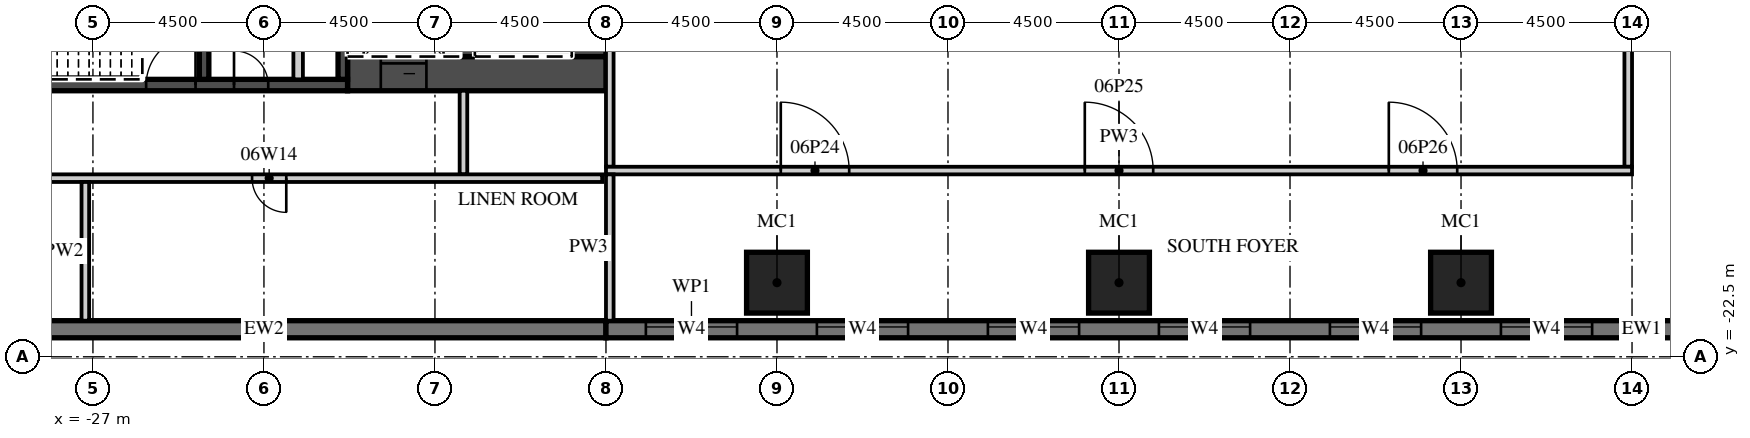
"""IFC4 building model, lengths in metres.
Left out: names, types, materials, properties, quantities, classifications, styles, units other than length and angle.
Written with IfcOpenShell. Run it as: python <this file> out.ifc"""

import sys

from ifc_helpers import new_model, si_unit, direction, frame, frame_2d, origin, origin_2d, place, context, subcontext, project, spatial, rectangle, extrude, element, fill, save


model = new_model("IFC4")
c1 = context("Model", 3, precision=1e-05, world=origin(), true_north=direction((0.0, 1.0)))
c2 = subcontext(c1, "Body", "Model", "MODEL_VIEW")
j1 = project(units=[si_unit("LENGTHUNIT", "METRE"), si_unit("PLANEANGLEUNIT", "RADIAN")], contexts=[c1])
p1 = place(None, origin())
s1 = spatial("IfcSite", under=j1, at=p1, CompositionType="ELEMENT")
p2 = place(p1, origin())
s2 = spatial("IfcBuilding", under=s1, at=p2, CompositionType="ELEMENT")
p3 = place(p2, frame((0.0, 0.0, 38.0)))
s3 = spatial("IfcBuildingStorey", under=s2, at=p3, CompositionType="ELEMENT", Elevation=38.0)
for number, where, z_axis, x_axis in (
    (1, (-9.0, -20.55, 0.0), (0.0, 0.0, 1.0), (1.0, 0.0, 0.0)),
    (2, (0.0, -20.55, 0.0), (0.0, 0.0, 1.0), (1.0, 0.0, 0.0)),
    (3, (9.0, -20.55, 0.0), (0.0, 0.0, 1.0), (1.0, 0.0, 0.0)),
):
    element("IfcColumn", number, at=place(p3, frame(where, z_axis=z_axis, x_axis=x_axis)), inside=s3, PredefinedType="COLUMN", context=c2, shape_type="SweptSolid", body=[
        extrude(rectangle(XDim=1.6, YDim=1.6, at=origin_2d()), origin(), (0.0, 0.0, 1.0), 8.7),
    ])
p4 = place(p3, frame((-31.5, -21.775, 0.0), z_axis=(0.0, 0.0, 1.0), x_axis=(1.0, 0.0, 0.0)))
e4 = element("IfcWall", 4, at=p4, inside=s3, PredefinedType="SOLIDWALL", context=c2, shape_type="SweptSolid", body=[
    extrude(rectangle(XDim=18.0, YDim=0.45, at=frame_2d((9.0, 0.0))), origin(), (0.0, 0.0, 1.0), 8.7),
])
p5 = place(p3, frame((-13.5, -21.775, 0.0), z_axis=(0.0, 0.0, 1.0), x_axis=(1.0, 0.0, 0.0)))
e5 = element("IfcWall", 5, at=p5, inside=s3, PredefinedType="SOLIDWALL", context=c2, shape_type="SweptSolid", body=[
    extrude(rectangle(XDim=54.5, YDim=0.45, at=frame_2d((27.25, 0.0))), origin(), (0.0, 0.0, 1.0), 8.7),
])
p6 = place(p5, frame((1.05, 0.0, 0.9)))
e6 = element("IfcOpeningElement", 6, at=p6, cuts=e5, PredefinedType="OPENING", context=c2, shape_type="SweptSolid", body=[
    extrude(rectangle(XDim=2.4, YDim=1.8, at=frame_2d((1.2, 0.9))), frame((0.0, 0.235, 0.0), z_axis=(0.0, -1.0, 0.0), x_axis=(1.0, 0.0, 0.0)), (0.0, 0.0, 1.0), 0.47),
])
p7 = place(p5, frame((5.55, 0.0, 0.9)))
e7 = element("IfcOpeningElement", 7, at=p7, cuts=e5, PredefinedType="OPENING", context=c2, shape_type="SweptSolid", body=[
    extrude(rectangle(XDim=2.4, YDim=1.8, at=frame_2d((1.2, 0.9))), frame((0.0, 0.235, 0.0), z_axis=(0.0, -1.0, 0.0), x_axis=(1.0, 0.0, 0.0)), (0.0, 0.0, 1.0), 0.47),
])
p8 = place(p5, frame((10.05, 0.0, 0.9)))
e8 = element("IfcOpeningElement", 8, at=p8, cuts=e5, PredefinedType="OPENING", context=c2, shape_type="SweptSolid", body=[
    extrude(rectangle(XDim=2.4, YDim=1.8, at=frame_2d((1.2, 0.9))), frame((0.0, 0.235, 0.0), z_axis=(0.0, -1.0, 0.0), x_axis=(1.0, 0.0, 0.0)), (0.0, 0.0, 1.0), 0.47),
])
p9 = place(p5, frame((14.55, 0.0, 0.9)))
e9 = element("IfcOpeningElement", 9, at=p9, cuts=e5, PredefinedType="OPENING", context=c2, shape_type="SweptSolid", body=[
    extrude(rectangle(XDim=2.4, YDim=1.8, at=frame_2d((1.2, 0.9))), frame((0.0, 0.235, 0.0), z_axis=(0.0, -1.0, 0.0), x_axis=(1.0, 0.0, 0.0)), (0.0, 0.0, 1.0), 0.47),
])
p10 = place(p5, frame((19.05, 0.0, 0.9)))
e10 = element("IfcOpeningElement", 10, at=p10, cuts=e5, PredefinedType="OPENING", context=c2, shape_type="SweptSolid", body=[
    extrude(rectangle(XDim=2.4, YDim=1.8, at=frame_2d((1.2, 0.9))), frame((0.0, 0.235, 0.0), z_axis=(0.0, -1.0, 0.0), x_axis=(1.0, 0.0, 0.0)), (0.0, 0.0, 1.0), 0.47),
])
p11 = place(p5, frame((23.55, 0.0, 0.9)))
e11 = element("IfcOpeningElement", 11, at=p11, cuts=e5, PredefinedType="OPENING", context=c2, shape_type="SweptSolid", body=[
    extrude(rectangle(XDim=2.4, YDim=1.8, at=frame_2d((1.2, 0.9))), frame((0.0, 0.235, 0.0), z_axis=(0.0, -1.0, 0.0), x_axis=(1.0, 0.0, 0.0)), (0.0, 0.0, 1.0), 0.47),
])
p12 = place(p5, frame((28.05, 0.0, 0.9)))
e12 = element("IfcOpeningElement", 12, at=p12, cuts=e5, PredefinedType="OPENING", context=c2, shape_type="SweptSolid", body=[
    extrude(rectangle(XDim=2.4, YDim=1.8, at=frame_2d((1.2, 0.9))), frame((0.0, 0.235, 0.0), z_axis=(0.0, -1.0, 0.0), x_axis=(1.0, 0.0, 0.0)), (0.0, 0.0, 1.0), 0.47),
])
p13 = place(p5, frame((32.55, 0.0, 0.9)))
e13 = element("IfcOpeningElement", 13, at=p13, cuts=e5, PredefinedType="OPENING", context=c2, shape_type="SweptSolid", body=[
    extrude(rectangle(XDim=2.4, YDim=1.8, at=frame_2d((1.2, 0.9))), frame((0.0, 0.235, 0.0), z_axis=(0.0, -1.0, 0.0), x_axis=(1.0, 0.0, 0.0)), (0.0, 0.0, 1.0), 0.47),
])
p14 = place(p5, frame((37.05, 0.0, 0.9)))
e14 = element("IfcOpeningElement", 14, at=p14, cuts=e5, PredefinedType="OPENING", context=c2, shape_type="SweptSolid", body=[
    extrude(rectangle(XDim=2.4, YDim=1.8, at=frame_2d((1.2, 0.9))), frame((0.0, 0.235, 0.0), z_axis=(0.0, -1.0, 0.0), x_axis=(1.0, 0.0, 0.0)), (0.0, 0.0, 1.0), 0.47),
])
p15 = place(p5, frame((41.55, 0.0, 0.9)))
e15 = element("IfcOpeningElement", 15, at=p15, cuts=e5, PredefinedType="OPENING", context=c2, shape_type="SweptSolid", body=[
    extrude(rectangle(XDim=2.4, YDim=1.8, at=frame_2d((1.2, 0.9))), frame((0.0, 0.235, 0.0), z_axis=(0.0, -1.0, 0.0), x_axis=(1.0, 0.0, 0.0)), (0.0, 0.0, 1.0), 0.47),
])
p16 = place(p5, frame((46.05, 0.0, 0.9)))
e16 = element("IfcOpeningElement", 16, at=p16, cuts=e5, PredefinedType="OPENING", context=c2, shape_type="SweptSolid", body=[
    extrude(rectangle(XDim=2.4, YDim=1.8, at=frame_2d((1.2, 0.9))), frame((0.0, 0.235, 0.0), z_axis=(0.0, -1.0, 0.0), x_axis=(1.0, 0.0, 0.0)), (0.0, 0.0, 1.0), 0.47),
])
p17 = place(p3, frame((-20.3, -15.05, 0.0), z_axis=(0.0, 0.0, 1.0), x_axis=(1.0, 0.0, 0.0)))
e17 = element("IfcWall", 17, at=p17, inside=s3, PredefinedType="SHEAR", context=c2, shape_type="SweptSolid", body=[
    extrude(rectangle(XDim=6.8, YDim=0.9, at=frame_2d((3.4, 0.0))), origin(), (0.0, 0.0, 1.0), 8.7),
])
p18 = place(p17, frame((0.875, 0.0, 0.0)))
e18 = element("IfcOpeningElement", 18, at=p18, cuts=e17, PredefinedType="OPENING", context=c2, shape_type="SweptSolid", body=[
    extrude(rectangle(XDim=1.2, YDim=2.1, at=frame_2d((0.6, 1.05))), frame((0.0, 0.46, 0.0), z_axis=(0.0, -1.0, 0.0), x_axis=(1.0, 0.0, 0.0)), (0.0, 0.0, 1.0), 0.92),
])
p19 = place(p3, frame((-30.6, -15.35, 0.0), z_axis=(0.0, 0.0, 1.0), x_axis=(1.0, 0.0, 0.0)))
e19 = element("IfcWall", 19, at=p19, inside=s3, PredefinedType="SHEAR", context=c2, shape_type="SweptSolid", body=[
    extrude(rectangle(XDim=10.3, YDim=0.3, at=frame_2d((5.15, 0.0))), origin(), (0.0, 0.0, 1.0), 8.7),
])
p20 = place(p19, frame((5.0, 0.0, 0.0)))
e20 = element("IfcOpeningElement", 20, at=p20, cuts=e19, PredefinedType="OPENING", context=c2, shape_type="SweptSolid", body=[
    extrude(rectangle(XDim=1.3, YDim=2.1, at=frame_2d((0.65, 1.05))), frame((0.0, 0.16, 0.0), z_axis=(0.0, -1.0, 0.0), x_axis=(1.0, 0.0, 0.0)), (0.0, 0.0, 1.0), 0.32),
])
p21 = place(p19, frame((7.312, 0.0, 0.0)))
e21 = element("IfcOpeningElement", 21, at=p21, cuts=e19, PredefinedType="OPENING", context=c2, shape_type="SweptSolid", body=[
    extrude(rectangle(XDim=0.9, YDim=2.1, at=frame_2d((0.45, 1.05))), frame((0.0, 0.16, 0.0), z_axis=(0.0, -1.0, 0.0), x_axis=(1.0, 0.0, 0.0)), (0.0, 0.0, 1.0), 0.32),
])
p22 = place(p3, frame((-13.95, -14.6, 0.0), z_axis=(0.0, 0.0, 1.0), x_axis=(0.0, 1.0, 0.0)))
e22 = element("IfcWall", 22, at=p22, inside=s3, PredefinedType="SHEAR", context=c2, shape_type="SweptSolid", body=[
    extrude(rectangle(XDim=12.2, YDim=0.9, at=frame_2d((6.1, 0.0))), origin(), (0.0, 0.0, 1.0), 8.7),
])
p23 = place(p3, frame((-17.15, -14.6, 0.0), z_axis=(0.0, 0.0, 1.0), x_axis=(0.0, 1.0, 0.0)))
e23 = element("IfcWall", 23, at=p23, inside=s3, PredefinedType="SHEAR", context=c2, shape_type="SweptSolid", body=[
    extrude(rectangle(XDim=5.8, YDim=0.4, at=frame_2d((2.9, 0.0))), origin(), (0.0, 0.0, 1.0), 8.7),
])
for number, where, z_axis, x_axis in (
    (24, (-20.425, -15.2, 0.0), (0.0, 0.0, 1.0), (0.0, 1.0, 0.0)),
    (25, (-24.075, -15.2, 0.0), (0.0, 0.0, 1.0), (0.0, 1.0, 0.0)),
):
    element("IfcWall", number, at=place(p3, frame(where, z_axis=z_axis, x_axis=x_axis)), inside=s3, PredefinedType="SHEAR", context=c2, shape_type="SweptSolid", body=[
        extrude(rectangle(XDim=3.25, YDim=0.25, at=frame_2d((1.625, 0.0))), origin(), (0.0, 0.0, 1.0), 8.7),
    ])
p24 = place(p3, frame((-21.6, -15.2, 0.0), z_axis=(0.0, 0.0, 1.0), x_axis=(0.0, 1.0, 0.0)))
e26 = element("IfcWall", 26, at=p24, inside=s3, PredefinedType="PARTITIONING", context=c2, shape_type="SweptSolid", body=[
    extrude(rectangle(XDim=3.25, YDim=0.25, at=frame_2d((1.625, 0.0))), origin(), (0.0, 0.0, 1.0), 8.7),
])
p25 = place(p3, frame((-17.25, -17.7, 0.0), z_axis=(0.0, 0.0, 1.0), x_axis=(0.0, 1.0, 0.0)))
e27 = element("IfcWall", 27, at=p25, inside=s3, PredefinedType="PARTITIONING", context=c2, shape_type="SweptSolid", body=[
    extrude(rectangle(XDim=2.2, YDim=0.2, at=frame_2d((1.1, 0.0))), origin(), (0.0, 0.0, 1.0), 8.7),
])
p26 = place(p3, frame((-44.55, -17.8, 0.0), z_axis=(0.0, 0.0, 1.0), x_axis=(1.0, 0.0, 0.0)))
e28 = element("IfcWall", 28, at=p26, inside=s3, PredefinedType="PARTITIONING", context=c2, shape_type="SweptSolid", body=[
    extrude(rectangle(XDim=30.95, YDim=0.2, at=frame_2d((15.475, 0.0))), origin(), (0.0, 0.0, 1.0), 8.7),
])
p27 = place(p26, frame((13.438, 0.0, 0.0)))
e29 = element("IfcOpeningElement", 29, at=p27, cuts=e28, PredefinedType="OPENING", context=c2, shape_type="SweptSolid", body=[
    extrude(rectangle(XDim=0.9, YDim=2.1, at=frame_2d((0.45, 1.05))), frame((0.0, 0.11, 0.0), z_axis=(0.0, -1.0, 0.0), x_axis=(1.0, 0.0, 0.0)), (0.0, 0.0, 1.0), 0.22),
])
p28 = place(p26, frame((21.738, 0.0, 0.0)))
e30 = element("IfcOpeningElement", 30, at=p28, cuts=e28, PredefinedType="OPENING", context=c2, shape_type="SweptSolid", body=[
    extrude(rectangle(XDim=0.9, YDim=2.1, at=frame_2d((0.45, 1.05))), frame((0.0, 0.11, 0.0), z_axis=(0.0, -1.0, 0.0), x_axis=(1.0, 0.0, 0.0)), (0.0, 0.0, 1.0), 0.22),
])
p29 = place(p3, frame((-27.2, -21.55, 0.0), z_axis=(0.0, 0.0, 1.0), x_axis=(0.0, 1.0, 0.0)))
e31 = element("IfcWall", 31, at=p29, inside=s3, PredefinedType="PARTITIONING", context=c2, shape_type="SweptSolid", body=[
    extrude(rectangle(XDim=3.65, YDim=0.2, at=frame_2d((1.825, 0.0))), origin(), (0.0, 0.0, 1.0), 8.7),
])
p30 = place(p3, frame((-13.4, -17.5, 0.0), z_axis=(0.0, 0.0, 1.0), x_axis=(0.0, 1.0, 0.0)))
e32 = element("IfcWall", 32, at=p30, inside=s3, PredefinedType="PARTITIONING", context=c2, shape_type="SweptSolid", body=[
    extrude(rectangle(XDim=35.0, YDim=0.2, at=frame_2d((17.5, 0.0))), origin(), (0.0, 0.0, 1.0), 8.7),
])
p31 = place(p30, frame((22.6, 0.0, 0.0)))
e33 = element("IfcOpeningElement", 33, at=p31, cuts=e32, PredefinedType="OPENING", context=c2, shape_type="SweptSolid", body=[
    extrude(rectangle(XDim=1.8, YDim=2.1, at=frame_2d((0.9, 1.05))), frame((0.0, 0.11, 0.0), z_axis=(0.0, -1.0, 0.0), x_axis=(1.0, 0.0, 0.0)), (0.0, 0.0, 1.0), 0.22),
])
p32 = place(p30, frame((28.6, 0.0, 0.0)))
e34 = element("IfcOpeningElement", 34, at=p32, cuts=e32, PredefinedType="OPENING", context=c2, shape_type="SweptSolid", body=[
    extrude(rectangle(XDim=1.8, YDim=2.1, at=frame_2d((0.9, 1.05))), frame((0.0, 0.11, 0.0), z_axis=(0.0, -1.0, 0.0), x_axis=(1.0, 0.0, 0.0)), (0.0, 0.0, 1.0), 0.22),
])
p33 = place(p3, frame((13.4, -17.5, 0.0), z_axis=(0.0, 0.0, 1.0), x_axis=(0.0, 1.0, 0.0)))
e35 = element("IfcWall", 35, at=p33, inside=s3, PredefinedType="PARTITIONING", context=c2, shape_type="SweptSolid", body=[
    extrude(rectangle(XDim=35.0, YDim=0.2, at=frame_2d((17.5, 0.0))), origin(), (0.0, 0.0, 1.0), 8.7),
])
p34 = place(p33, frame((10.6, 0.0, 0.0)))
e36 = element("IfcOpeningElement", 36, at=p34, cuts=e35, PredefinedType="OPENING", context=c2, shape_type="SweptSolid", body=[
    extrude(rectangle(XDim=1.8, YDim=2.1, at=frame_2d((0.9, 1.05))), frame((0.0, 0.11, 0.0), z_axis=(0.0, -1.0, 0.0), x_axis=(1.0, 0.0, 0.0)), (0.0, 0.0, 1.0), 0.22),
])
p35 = place(p33, frame((4.6, 0.0, 0.0)))
e37 = element("IfcOpeningElement", 37, at=p35, cuts=e35, PredefinedType="OPENING", context=c2, shape_type="SweptSolid", body=[
    extrude(rectangle(XDim=1.8, YDim=2.1, at=frame_2d((0.9, 1.05))), frame((0.0, 0.11, 0.0), z_axis=(0.0, -1.0, 0.0), x_axis=(1.0, 0.0, 0.0)), (0.0, 0.0, 1.0), 0.22),
])
p36 = place(p3, frame((-13.5, -17.6, 0.0), z_axis=(0.0, 0.0, 1.0), x_axis=(1.0, 0.0, 0.0)))
e38 = element("IfcWall", 38, at=p36, inside=s3, PredefinedType="PARTITIONING", context=c2, shape_type="SweptSolid", body=[
    extrude(rectangle(XDim=27.0, YDim=0.2, at=frame_2d((13.5, 0.0))), origin(), (0.0, 0.0, 1.0), 8.7),
])
p37 = place(p36, frame((4.6, 0.0, 0.0)))
e39 = element("IfcOpeningElement", 39, at=p37, cuts=e38, PredefinedType="OPENING", context=c2, shape_type="SweptSolid", body=[
    extrude(rectangle(XDim=1.8, YDim=2.1, at=frame_2d((0.9, 1.05))), frame((0.0, 0.11, 0.0), z_axis=(0.0, -1.0, 0.0), x_axis=(1.0, 0.0, 0.0)), (0.0, 0.0, 1.0), 0.22),
])
p38 = place(p36, frame((12.6, 0.0, 0.0)))
e40 = element("IfcOpeningElement", 40, at=p38, cuts=e38, PredefinedType="OPENING", context=c2, shape_type="SweptSolid", body=[
    extrude(rectangle(XDim=1.8, YDim=2.1, at=frame_2d((0.9, 1.05))), frame((0.0, 0.11, 0.0), z_axis=(0.0, -1.0, 0.0), x_axis=(1.0, 0.0, 0.0)), (0.0, 0.0, 1.0), 0.22),
])
p39 = place(p36, frame((20.6, 0.0, 0.0)))
e41 = element("IfcOpeningElement", 41, at=p39, cuts=e38, PredefinedType="OPENING", context=c2, shape_type="SweptSolid", body=[
    extrude(rectangle(XDim=1.8, YDim=2.1, at=frame_2d((0.9, 1.05))), frame((0.0, 0.11, 0.0), z_axis=(0.0, -1.0, 0.0), x_axis=(1.0, 0.0, 0.0)), (0.0, 0.0, 1.0), 0.22),
])
p40 = place(p3, frame((-13.4, -21.55, 0.0), z_axis=(0.0, 0.0, 1.0), x_axis=(0.0, 1.0, 0.0)))
e42 = element("IfcWall", 42, at=p40, inside=s3, PredefinedType="PARTITIONING", context=c2, shape_type="SweptSolid", body=[
    extrude(rectangle(XDim=3.85, YDim=0.2, at=frame_2d((1.925, 0.0))), origin(), (0.0, 0.0, 1.0), 8.7),
])
p41 = place(p6, origin())
e43 = element("IfcWindow", 43, at=p41, inside=s3, PartitioningType="SINGLE_PANEL", PredefinedType="WINDOW", context=c2, shape_type="SweptSolid", body=[
    extrude(rectangle(XDim=2.4, YDim=1.8, at=frame_2d((1.2, 0.9))), frame((0.0, 0.09, 0.0), z_axis=(0.0, -1.0, 0.0), x_axis=(1.0, 0.0, 0.0)), (0.0, 0.0, 1.0), 0.06),
])
fill(e6, e43)
p42 = place(p7, origin())
e44 = element("IfcWindow", 44, at=p42, inside=s3, PartitioningType="SINGLE_PANEL", PredefinedType="WINDOW", context=c2, shape_type="SweptSolid", body=[
    extrude(rectangle(XDim=2.4, YDim=1.8, at=frame_2d((1.2, 0.9))), frame((0.0, 0.09, 0.0), z_axis=(0.0, -1.0, 0.0), x_axis=(1.0, 0.0, 0.0)), (0.0, 0.0, 1.0), 0.06),
])
fill(e7, e44)
p43 = place(p8, origin())
e45 = element("IfcWindow", 45, at=p43, inside=s3, PartitioningType="SINGLE_PANEL", PredefinedType="WINDOW", context=c2, shape_type="SweptSolid", body=[
    extrude(rectangle(XDim=2.4, YDim=1.8, at=frame_2d((1.2, 0.9))), frame((0.0, 0.09, 0.0), z_axis=(0.0, -1.0, 0.0), x_axis=(1.0, 0.0, 0.0)), (0.0, 0.0, 1.0), 0.06),
])
fill(e8, e45)
p44 = place(p9, origin())
e46 = element("IfcWindow", 46, at=p44, inside=s3, PartitioningType="SINGLE_PANEL", PredefinedType="WINDOW", context=c2, shape_type="SweptSolid", body=[
    extrude(rectangle(XDim=2.4, YDim=1.8, at=frame_2d((1.2, 0.9))), frame((0.0, 0.09, 0.0), z_axis=(0.0, -1.0, 0.0), x_axis=(1.0, 0.0, 0.0)), (0.0, 0.0, 1.0), 0.06),
])
fill(e9, e46)
p45 = place(p10, origin())
e47 = element("IfcWindow", 47, at=p45, inside=s3, PartitioningType="SINGLE_PANEL", PredefinedType="WINDOW", context=c2, shape_type="SweptSolid", body=[
    extrude(rectangle(XDim=2.4, YDim=1.8, at=frame_2d((1.2, 0.9))), frame((0.0, 0.09, 0.0), z_axis=(0.0, -1.0, 0.0), x_axis=(1.0, 0.0, 0.0)), (0.0, 0.0, 1.0), 0.06),
])
fill(e10, e47)
p46 = place(p11, origin())
e48 = element("IfcWindow", 48, at=p46, inside=s3, PartitioningType="SINGLE_PANEL", PredefinedType="WINDOW", context=c2, shape_type="SweptSolid", body=[
    extrude(rectangle(XDim=2.4, YDim=1.8, at=frame_2d((1.2, 0.9))), frame((0.0, 0.09, 0.0), z_axis=(0.0, -1.0, 0.0), x_axis=(1.0, 0.0, 0.0)), (0.0, 0.0, 1.0), 0.06),
])
fill(e11, e48)
p47 = place(p18, origin())
e49 = element("IfcDoor", 49, at=p47, inside=s3, OperationType="SLIDING_TO_LEFT", PredefinedType="DOOR", context=c2, shape_type="SweptSolid", body=[
    extrude(rectangle(XDim=1.2, YDim=2.1, at=frame_2d((0.6, 1.05))), frame((0.0, 0.025, 0.0), z_axis=(0.0, -1.0, 0.0), x_axis=(1.0, 0.0, 0.0)), (0.0, 0.0, 1.0), 0.05),
])
fill(e18, e49)
p48 = place(p20, origin())
e50 = element("IfcDoor", 50, at=p48, inside=s3, OperationType="SINGLE_SWING_RIGHT", PredefinedType="DOOR", context=c2, shape_type="SweptSolid", body=[
    extrude(rectangle(XDim=1.3, YDim=2.1, at=frame_2d((0.65, 1.05))), frame((0.0, 0.025, 0.0), z_axis=(0.0, -1.0, 0.0), x_axis=(1.0, 0.0, 0.0)), (0.0, 0.0, 1.0), 0.05),
])
fill(e20, e50)
p49 = place(p21, origin())
e51 = element("IfcDoor", 51, at=p49, inside=s3, OperationType="SINGLE_SWING_LEFT", PredefinedType="DOOR", context=c2, shape_type="SweptSolid", body=[
    extrude(rectangle(XDim=0.9, YDim=2.1, at=frame_2d((0.45, 1.05))), frame((0.0, 0.025, 0.0), z_axis=(0.0, -1.0, 0.0), x_axis=(1.0, 0.0, 0.0)), (0.0, 0.0, 1.0), 0.05),
])
fill(e21, e51)
p50 = place(p28, origin())
e52 = element("IfcDoor", 52, at=p50, inside=s3, OperationType="SINGLE_SWING_RIGHT", PredefinedType="DOOR", context=c2, shape_type="SweptSolid", body=[
    extrude(rectangle(XDim=0.9, YDim=2.1, at=frame_2d((0.45, 1.05))), frame((0.0, 0.025, 0.0), z_axis=(0.0, -1.0, 0.0), x_axis=(1.0, 0.0, 0.0)), (0.0, 0.0, 1.0), 0.05),
])
fill(e30, e52)
p51 = place(p37, origin())
e53 = element("IfcDoor", 53, at=p51, inside=s3, OperationType="DOUBLE_DOOR_DOUBLE_SWING", PredefinedType="DOOR", context=c2, shape_type="SweptSolid", body=[
    extrude(rectangle(XDim=1.8, YDim=2.1, at=frame_2d((0.9, 1.05))), frame((0.0, 0.025, 0.0), z_axis=(0.0, -1.0, 0.0), x_axis=(1.0, 0.0, 0.0)), (0.0, 0.0, 1.0), 0.05),
])
fill(e39, e53)
p52 = place(p38, origin())
e54 = element("IfcDoor", 54, at=p52, inside=s3, OperationType="DOUBLE_DOOR_DOUBLE_SWING", PredefinedType="DOOR", context=c2, shape_type="SweptSolid", body=[
    extrude(rectangle(XDim=1.8, YDim=2.1, at=frame_2d((0.9, 1.05))), frame((0.0, 0.025, 0.0), z_axis=(0.0, -1.0, 0.0), x_axis=(1.0, 0.0, 0.0)), (0.0, 0.0, 1.0), 0.05),
])
fill(e40, e54)
p53 = place(p39, origin())
e55 = element("IfcDoor", 55, at=p53, inside=s3, OperationType="DOUBLE_DOOR_DOUBLE_SWING", PredefinedType="DOOR", context=c2, shape_type="SweptSolid", body=[
    extrude(rectangle(XDim=1.8, YDim=2.1, at=frame_2d((0.9, 1.05))), frame((0.0, 0.025, 0.0), z_axis=(0.0, -1.0, 0.0), x_axis=(1.0, 0.0, 0.0)), (0.0, 0.0, 1.0), 0.05),
])
fill(e41, e55)
save(model, sys.argv[1])
